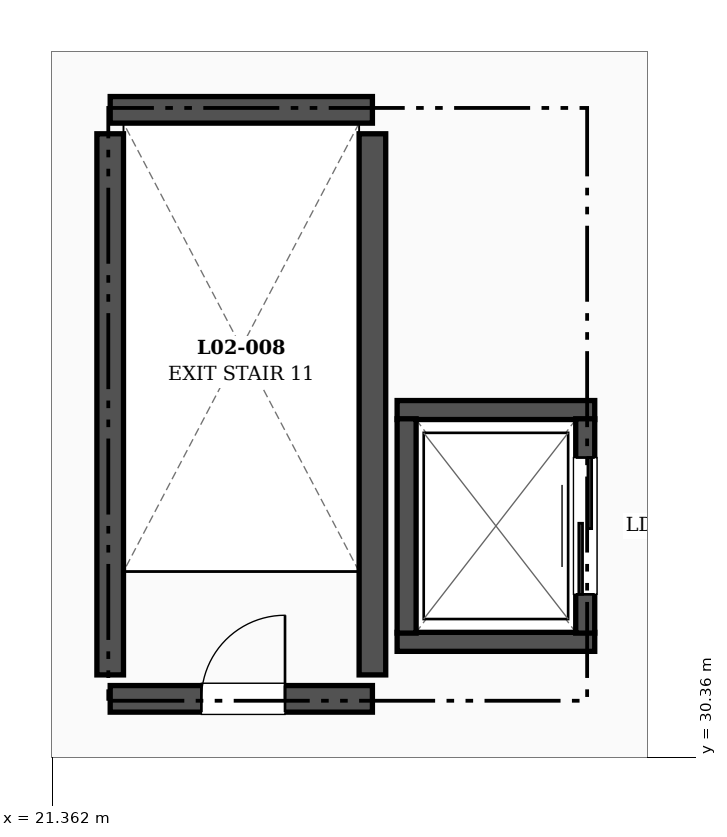
"""IFC4 building model, lengths in metres.
Left out: names, types, materials, properties, quantities, classifications, styles, units other than length and angle.
Written with IfcOpenShell. Run it as: python <this file> out.ifc"""

import sys

from ifc_helpers import new_model, si_unit, direction, frame, frame_2d, origin, place, context, subcontext, project, spatial, rectangle, extrude, element, fill, save


model = new_model("IFC4")
c1 = context("Model", 3, precision=1e-05, world=origin(), true_north=direction((0.0, 1.0)))
c2 = subcontext(c1, "Body", "Model", "MODEL_VIEW")
j1 = project(units=[si_unit("LENGTHUNIT", "METRE"), si_unit("PLANEANGLEUNIT", "RADIAN")], contexts=[c1])
p1 = place(None, origin())
s1 = spatial("IfcSite", under=j1, at=p1, CompositionType="ELEMENT")
p2 = place(p1, origin())
s2 = spatial("IfcBuilding", under=s1, at=p2, CompositionType="ELEMENT")
p3 = place(p2, frame((0.0, 0.0, 10.8)))
s3 = spatial("IfcBuildingStorey", under=s2, at=p3, CompositionType="ELEMENT", Elevation=10.8)
p4 = place(p3, frame((22.125, 31.125, 0.0), z_axis=(0.0, 0.0, 1.0), x_axis=(1.0, 0.0, 0.0)))
e1 = element("IfcWall", 1, at=p4, inside=s3, PredefinedType="SHEAR", context=c2, shape_type="SweptSolid", body=[
    extrude(rectangle(XDim=3.45, YDim=0.35, at=frame_2d((1.725, 0.0))), origin(), (0.0, 0.0, 1.0), 3.98),
])
p5 = place(p4, frame((1.2, 0.0, 0.0)))
e2 = element("IfcOpeningElement", 2, at=p5, cuts=e1, PredefinedType="OPENING", context=c2, shape_type="SweptSolid", body=[
    extrude(rectangle(XDim=1.1, YDim=2.2, at=frame_2d((0.55, 1.1))), frame((0.0, 0.185, 0.0), z_axis=(0.0, -1.0, 0.0), x_axis=(1.0, 0.0, 0.0)), (0.0, 0.0, 1.0), 0.37),
])
p6 = place(p3, frame((22.125, 38.875, 0.0), z_axis=(0.0, 0.0, 1.0), x_axis=(1.0, 0.0, 0.0)))
e3 = element("IfcWall", 3, at=p6, inside=s3, PredefinedType="SHEAR", context=c2, shape_type="SweptSolid", body=[
    extrude(rectangle(XDim=3.45, YDim=0.35, at=frame_2d((1.725, 0.0))), origin(), (0.0, 0.0, 1.0), 3.98),
])
for number, where, z_axis, x_axis in (
    (4, (22.125, 31.44, 0.0), (0.0, 0.0, 1.0), (0.0, 1.0, 0.0)),
    (5, (25.575, 31.44, 0.0), (0.0, 0.0, 1.0), (0.0, 1.0, 0.0)),
):
    element("IfcWall", number, at=place(p3, frame(where, z_axis=z_axis, x_axis=x_axis)), inside=s3, PredefinedType="SHEAR", context=c2, shape_type="SweptSolid", body=[
        extrude(rectangle(XDim=7.12, YDim=0.35, at=frame_2d((3.56, 0.0))), origin(), (0.0, 0.0, 1.0), 3.98),
    ])
for number, where, z_axis, x_axis in (
    (6, (25.9, 31.875, 0.0), (0.0, 0.0, 1.0), (1.0, 0.0, 0.0)),
    (7, (25.9, 34.925, 0.0), (0.0, 0.0, 1.0), (1.0, 0.0, 0.0)),
):
    element("IfcWall", number, at=place(p3, frame(where, z_axis=z_axis, x_axis=x_axis)), inside=s3, PredefinedType="SHEAR", context=c2, shape_type="SweptSolid", body=[
        extrude(rectangle(XDim=2.6, YDim=0.25, at=frame_2d((1.3, 0.0))), origin(), (0.0, 0.0, 1.0), 3.98),
    ])
p7 = place(p3, frame((26.025, 31.99, 0.0), z_axis=(0.0, 0.0, 1.0), x_axis=(0.0, 1.0, 0.0)))
e8 = element("IfcWall", 8, at=p7, inside=s3, PredefinedType="SHEAR", context=c2, shape_type="SweptSolid", body=[
    extrude(rectangle(XDim=2.82, YDim=0.25, at=frame_2d((1.41, 0.0))), origin(), (0.0, 0.0, 1.0), 3.98),
])
p8 = place(p3, frame((28.375, 31.99, 0.0), z_axis=(0.0, 0.0, 1.0), x_axis=(0.0, 1.0, 0.0)))
e9 = element("IfcWall", 9, at=p8, inside=s3, PredefinedType="SHEAR", context=c2, shape_type="SweptSolid", body=[
    extrude(rectangle(XDim=2.82, YDim=0.25, at=frame_2d((1.41, 0.0))), origin(), (0.0, 0.0, 1.0), 3.98),
])
p9 = place(p8, frame((0.51, 0.0, 0.0)))
e10 = element("IfcOpeningElement", 10, at=p9, cuts=e9, PredefinedType="OPENING", context=c2, shape_type="SweptSolid", body=[
    extrude(rectangle(XDim=1.8, YDim=2.4, at=frame_2d((0.9, 1.2))), frame((0.0, 0.135, 0.0), z_axis=(0.0, -1.0, 0.0), x_axis=(1.0, 0.0, 0.0)), (0.0, 0.0, 1.0), 0.27),
])
p10 = place(p5, origin())
e11 = element("IfcDoor", 11, at=p10, inside=s3, OperationType="SINGLE_SWING_RIGHT", PredefinedType="DOOR", context=c2, shape_type="SweptSolid", body=[
    extrude(rectangle(XDim=1.1, YDim=2.2, at=frame_2d((0.55, 1.1))), frame((0.0, 0.025, 0.0), z_axis=(0.0, -1.0, 0.0), x_axis=(1.0, 0.0, 0.0)), (0.0, 0.0, 1.0), 0.05),
])
fill(e2, e11)
p11 = place(p9, origin())
e12 = element("IfcDoor", 12, at=p11, inside=s3, OperationType="DOUBLE_DOOR_SLIDING", PredefinedType="DOOR", context=c2, shape_type="SweptSolid", body=[
    extrude(rectangle(XDim=1.8, YDim=2.4, at=frame_2d((0.9, 1.2))), frame((0.0, 0.025, 0.0), z_axis=(0.0, -1.0, 0.0), x_axis=(1.0, 0.0, 0.0)), (0.0, 0.0, 1.0), 0.05),
])
fill(e10, e12)
save(model, sys.argv[1])
